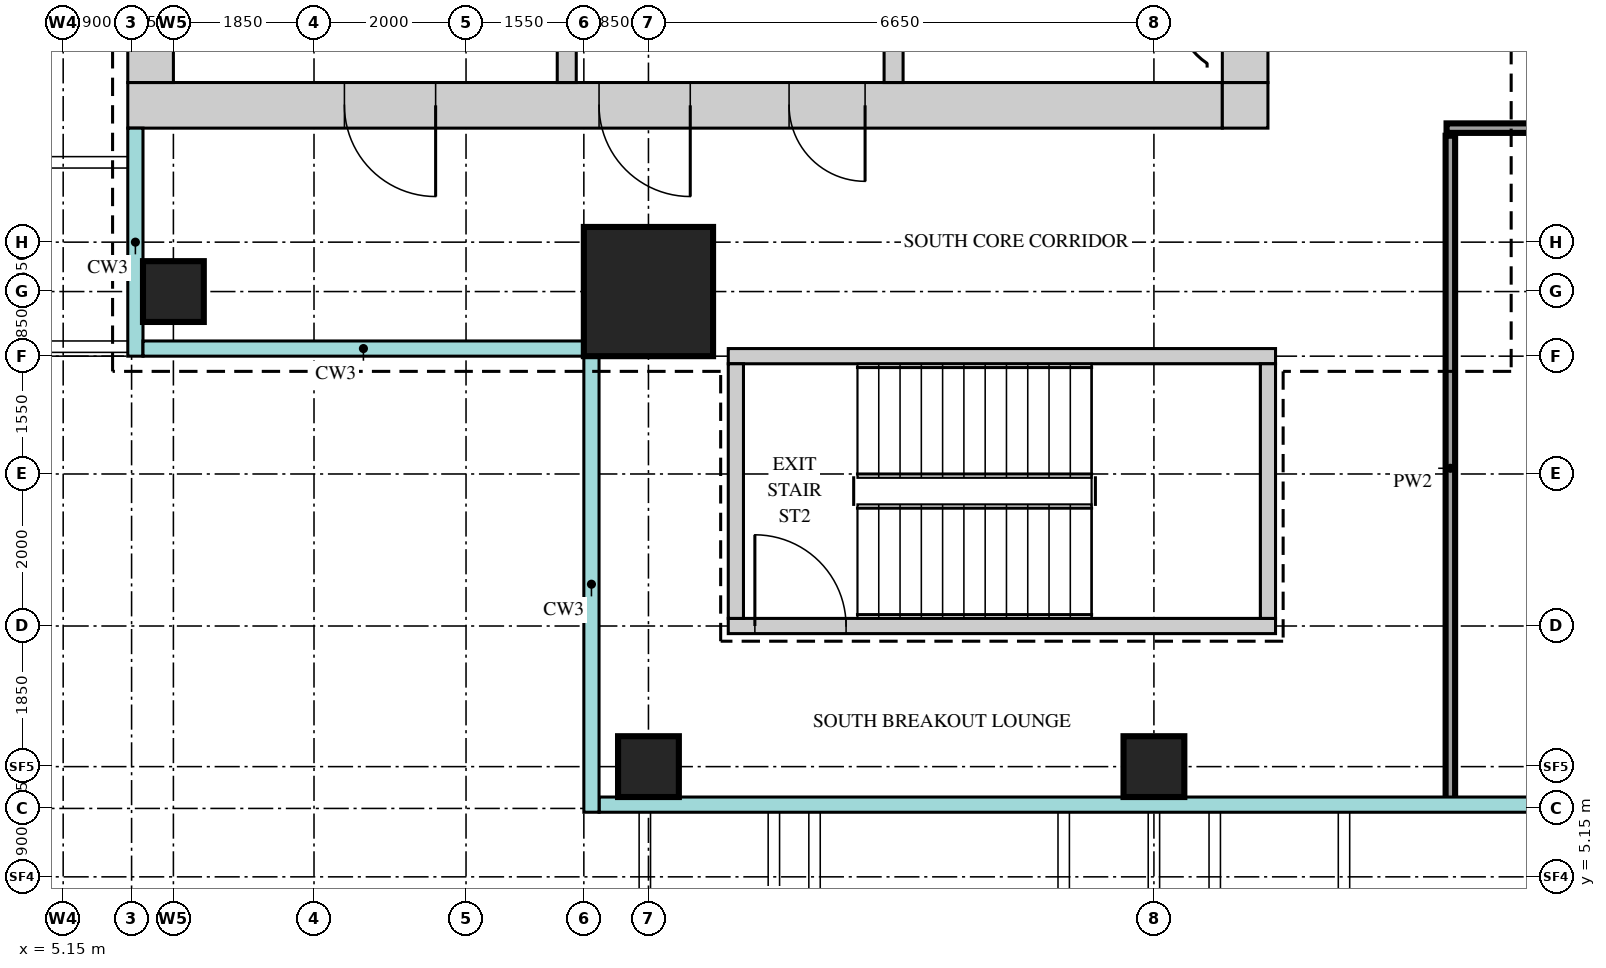
"""IFC4 building model, lengths in metres.
Left out: names, types, materials, properties, quantities, classifications, styles, units other than length and angle.
Written with IfcOpenShell. Run it as: python <this file> out.ifc"""

import sys

from ifc_helpers import new_model, si_unit, direction, frame, frame_2d, origin, origin_2d, place, context, subcontext, project, spatial, rectangle, extrude, source, transform, mapped, element, fill, save


model = new_model("IFC4")
c1 = context("Model", 3, precision=1e-05, world=origin(), true_north=direction((0.0, 1.0)))
c2 = subcontext(c1, "Body", "Model", "MODEL_VIEW")
j1 = project(units=[si_unit("LENGTHUNIT", "METRE"), si_unit("PLANEANGLEUNIT", "RADIAN")], contexts=[c1])
p1 = place(None, origin())
s1 = spatial("IfcSite", under=j1, at=p1, CompositionType="ELEMENT")
p2 = place(p1, origin())
s2 = spatial("IfcBuilding", under=s1, at=p2, CompositionType="ELEMENT")
p3 = place(p2, frame((0.0, 0.0, 306.2)))
s3 = spatial("IfcBuildingStorey", under=s2, at=p3, CompositionType="ELEMENT", Elevation=306.2)
m1 = source(origin(), c2, "Body", "SweptSolid", [
    extrude(rectangle(XDim=14.4, YDim=0.6, at=frame_2d((7.2, 0.0))), origin(), (0.0, 0.0, 1.0), 3.75),
])
p4 = place(p3, frame((6.0, 15.3, 0.0), z_axis=(0.0, 0.0, 1.0), x_axis=(1.0, 0.0, 0.0)))
e1 = element("IfcWall", 1, at=p4, inside=s3, PredefinedType="SHEAR", context=c2, shape_type="MappedRepresentation", body=[
    mapped(m1, transform((0.0, 0.0, 0.0))),
])
m2 = source(origin(), c2, "Body", "SweptSolid", [
    extrude(rectangle(XDim=1.2, YDim=2.1, at=frame_2d((0.6, 1.05))), frame((0.0, 0.31, 0.0), z_axis=(0.0, -1.0, 0.0), x_axis=(1.0, 0.0, 0.0)), (0.0, 0.0, 1.0), 0.62),
])
p5 = place(p4, frame((6.2, 0.0, 0.0)))
e2 = element("IfcOpeningElement", 2, at=p5, cuts=e1, PredefinedType="OPENING", context=c2, shape_type="MappedRepresentation", body=[
    mapped(m2, transform((0.0, 0.0, 0.0))),
])
p6 = place(p4, frame((2.85, 0.0, 0.0)))
e3 = element("IfcOpeningElement", 3, at=p6, cuts=e1, PredefinedType="OPENING", context=c2, shape_type="MappedRepresentation", body=[
    mapped(m2, transform((0.0, 0.0, 0.0))),
])
m3 = source(origin(), c2, "Body", "SweptSolid", [
    extrude(rectangle(XDim=1.0, YDim=2.1, at=frame_2d((0.5, 1.05))), frame((0.0, 0.31, 0.0), z_axis=(0.0, -1.0, 0.0), x_axis=(1.0, 0.0, 0.0)), (0.0, 0.0, 1.0), 0.62),
])
p7 = place(p4, frame((8.7, 0.0, 0.0)))
e4 = element("IfcOpeningElement", 4, at=p7, cuts=e1, PredefinedType="OPENING", context=c2, shape_type="MappedRepresentation", body=[
    mapped(m3, transform((0.0, 0.0, 0.0))),
])
m4 = source(origin(), c2, "Body", "SweptSolid", [
    extrude(rectangle(XDim=0.6, YDim=0.6, at=frame_2d((0.3, 0.0))), origin(), (0.0, 0.0, 1.0), 3.75),
])
p8 = place(p3, frame((20.4, 15.3, 0.0), z_axis=(0.0, 0.0, 1.0), x_axis=(1.0, 0.0, 0.0)))
e5 = element("IfcWall", 5, at=p8, inside=s3, PredefinedType="SHEAR", context=c2, shape_type="MappedRepresentation", body=[
    mapped(m4, transform((0.0, 0.0, 0.0))),
])
m5 = source(origin(), c2, "Body", "SweptSolid", [
    extrude(rectangle(XDim=22.8, YDim=0.6, at=frame_2d((11.4, 0.0))), origin(), (0.0, 0.0, 1.0), 3.75),
])
p9 = place(p3, frame((20.7, 15.6, 0.0), z_axis=(0.0, 0.0, 1.0), x_axis=(0.0, 1.0, 0.0)))
e6 = element("IfcWall", 6, at=p9, inside=s3, PredefinedType="SHEAR", context=c2, shape_type="MappedRepresentation", body=[
    mapped(m5, transform((0.0, 0.0, 0.0))),
])
m6 = source(origin(), c2, "Body", "SweptSolid", [
    extrude(rectangle(XDim=1.8, YDim=2.1, at=frame_2d((0.9, 1.05))), frame((0.0, 0.31, 0.0), z_axis=(0.0, -1.0, 0.0), x_axis=(1.0, 0.0, 0.0)), (0.0, 0.0, 1.0), 0.62),
])
p10 = place(p9, frame((10.9, 0.0, 0.0)))
e7 = element("IfcOpeningElement", 7, at=p10, cuts=e6, PredefinedType="OPENING", context=c2, shape_type="MappedRepresentation", body=[
    mapped(m6, transform((0.0, 0.0, 0.0))),
])
m7 = source(origin(), c2, "Body", "SweptSolid", [
    extrude(rectangle(XDim=0.9, YDim=2.1, at=frame_2d((0.45, 1.05))), frame((0.0, 0.31, 0.0), z_axis=(0.0, -1.0, 0.0), x_axis=(1.0, 0.0, 0.0)), (0.0, 0.0, 1.0), 0.62),
])
p11 = place(p9, frame((0.55, 0.0, 0.0)))
e8 = element("IfcOpeningElement", 8, at=p11, cuts=e6, PredefinedType="OPENING", context=c2, shape_type="MappedRepresentation", body=[
    mapped(m7, transform((0.0, 0.0, 0.0))),
])
p12 = place(p9, frame((3.0, 0.0, 0.0)))
e9 = element("IfcOpeningElement", 9, at=p12, cuts=e6, PredefinedType="OPENING", context=c2, shape_type="MappedRepresentation", body=[
    mapped(m7, transform((0.0, 0.0, 0.0))),
])
p13 = place(p9, frame((5.75, 0.0, 0.0)))
e10 = element("IfcOpeningElement", 10, at=p13, cuts=e6, PredefinedType="OPENING", context=c2, shape_type="MappedRepresentation", body=[
    mapped(m7, transform((0.0, 0.0, 0.0))),
])
p14 = place(p3, frame((6.3, 15.6, 0.0), z_axis=(0.0, 0.0, 1.0), x_axis=(0.0, 1.0, 0.0)))
e11 = element("IfcWall", 11, at=p14, inside=s3, PredefinedType="SHEAR", context=c2, shape_type="MappedRepresentation", body=[
    mapped(m5, transform((0.0, 0.0, 0.0))),
])
m8 = source(origin(), c2, "Body", "SweptSolid", [
    extrude(rectangle(XDim=7.2, YDim=0.2, at=frame_2d((3.6, 0.0))), origin(), (0.0, 0.0, 1.0), 3.75),
])
p15 = place(p3, frame((13.9, 12.0, 0.0), z_axis=(0.0, 0.0, 1.0), x_axis=(1.0, 0.0, 0.0)))
e12 = element("IfcWall", 12, at=p15, inside=s3, PredefinedType="SHEAR", context=c2, shape_type="MappedRepresentation", body=[
    mapped(m8, transform((0.0, 0.0, 0.0))),
])
p16 = place(p3, frame((13.9, 8.45, 0.0), z_axis=(0.0, 0.0, 1.0), x_axis=(1.0, 0.0, 0.0)))
e13 = element("IfcWall", 13, at=p16, inside=s3, PredefinedType="SHEAR", context=c2, shape_type="MappedRepresentation", body=[
    mapped(m8, transform((0.0, 0.0, 0.0))),
])
m9 = source(origin(), c2, "Body", "SweptSolid", [
    extrude(rectangle(XDim=1.2, YDim=2.1, at=frame_2d((0.6, 1.05))), frame((0.0, 0.11, 0.0), z_axis=(0.0, -1.0, 0.0), x_axis=(1.0, 0.0, 0.0)), (0.0, 0.0, 1.0), 0.22),
])
p17 = place(p16, frame((0.35, 0.0, 0.0)))
e14 = element("IfcOpeningElement", 14, at=p17, cuts=e13, PredefinedType="OPENING", context=c2, shape_type="MappedRepresentation", body=[
    mapped(m9, transform((0.0, 0.0, 0.0))),
])
m10 = source(origin(), c2, "Body", "SweptSolid", [
    extrude(rectangle(XDim=3.35, YDim=0.2, at=frame_2d((1.675, 0.0))), origin(), (0.0, 0.0, 1.0), 3.75),
])
for number, where, z_axis, x_axis in (
    (15, (21.0, 8.55, 0.0), (0.0, 0.0, 1.0), (0.0, 1.0, 0.0)),
    (16, (14.0, 8.55, 0.0), (0.0, 0.0, 1.0), (0.0, 1.0, 0.0)),
):
    element("IfcWall", number, at=place(p3, frame(where, z_axis=z_axis, x_axis=x_axis)), inside=s3, PredefinedType="SHEAR", context=c2, shape_type="MappedRepresentation", body=[
        mapped(m10, transform((0.0, 0.0, 0.0))),
    ])
m11 = source(origin(), c2, "Body", "SweptSolid", [
    extrude(rectangle(XDim=3.6, YDim=0.25, at=frame_2d((1.8, 0.0))), origin(), (0.0, 0.0, 1.0), 3.75),
])
for number, where, z_axis, x_axis in (
    (17, (16.075, 15.6, 0.0), (0.0, 0.0, 1.0), (0.0, 1.0, 0.0)),
    (18, (11.775, 15.6, 0.0), (0.0, 0.0, 1.0), (0.0, 1.0, 0.0)),
):
    element("IfcWall", number, at=place(p3, frame(where, z_axis=z_axis, x_axis=x_axis)), inside=s3, PredefinedType="STANDARD", context=c2, shape_type="MappedRepresentation", body=[
        mapped(m11, transform((0.0, 0.0, 0.0))),
    ])
m12 = source(origin(), c2, "Body", "SweptSolid", [
    extrude(rectangle(XDim=1.7, YDim=1.7, at=origin_2d()), origin(), (0.0, 0.0, 1.0), 3.75),
])
p18 = place(p3, frame((12.85, 12.85, 0.0), z_axis=(0.0, 0.0, 1.0), x_axis=(1.0, 0.0, 0.0)))
e19 = element("IfcColumn", 19, at=p18, inside=s3, PredefinedType="COLUMN", context=c2, shape_type="MappedRepresentation", body=[
    mapped(m12, transform((0.0, 0.0, 0.0))),
])
m13 = source(origin(), c2, "Body", "SweptSolid", [
    extrude(rectangle(XDim=0.8, YDim=0.8, at=origin_2d()), origin(), (0.0, 0.0, 1.0), 3.75),
])
for number, where, z_axis, x_axis in (
    (20, (12.85, 6.6, 0.0), (0.0, 0.0, 1.0), (1.0, 0.0, 0.0)),
    (21, (19.5, 6.6, 0.0), (0.0, 0.0, 1.0), (1.0, 0.0, 0.0)),
    (22, (6.6, 12.85, 0.0), (0.0, 0.0, 1.0), (1.0, 0.0, 0.0)),
):
    element("IfcColumn", number, at=place(p3, frame(where, z_axis=z_axis, x_axis=x_axis)), inside=s3, PredefinedType="COLUMN", context=c2, shape_type="MappedRepresentation", body=[
        mapped(m13, transform((0.0, 0.0, 0.0))),
    ])
m14 = source(origin(), c2, "Body", "SweptSolid", [
    extrude(rectangle(XDim=8.75, YDim=0.125, at=frame_2d((4.375, 0.0))), origin(), (0.0, 0.0, 1.0), 3.8),
])
p19 = place(p3, frame((23.4, 6.15, 0.0), z_axis=(0.0, 0.0, 1.0), x_axis=(0.0, 1.0, 0.0)))
e23 = element("IfcWall", 23, at=p19, inside=s3, PredefinedType="PARTITIONING", context=c2, shape_type="MappedRepresentation", body=[
    mapped(m14, transform((0.0, 0.0, 0.0))),
])
m15 = source(origin(), c2, "Body", "SweptSolid", [
    extrude(rectangle(XDim=19.1, YDim=0.125, at=frame_2d((9.55, 0.0))), origin(), (0.0, 0.0, 1.0), 3.8),
])
p20 = place(p3, frame((23.35, 15.0, 0.0), z_axis=(0.0, 0.0, 1.0), x_axis=(1.0, 0.0, 0.0)))
e24 = element("IfcWall", 24, at=p20, inside=s3, PredefinedType="PARTITIONING", context=c2, shape_type="MappedRepresentation", body=[
    mapped(m15, transform((0.0, 0.0, 0.0))),
])
m16 = source(origin(), c2, "Body", "SweptSolid", [
    extrude(rectangle(XDim=1.2, YDim=2.1, at=frame_2d((0.6, 1.05))), frame((0.0, 0.073, 0.0), z_axis=(0.0, -1.0, 0.0), x_axis=(1.0, 0.0, 0.0)), (0.0, 0.0, 1.0), 0.145),
])
p21 = place(p20, frame((7.75, 0.0, 0.0)))
e25 = element("IfcOpeningElement", 25, at=p21, cuts=e24, PredefinedType="OPENING", context=c2, shape_type="MappedRepresentation", body=[
    mapped(m16, transform((0.0, 0.0, 0.0))),
])
m17 = source(origin(), c2, "Body", "SweptSolid", [
    extrude(rectangle(XDim=1.2, YDim=2.1, at=frame_2d((0.6, 1.05))), frame((0.0, 0.25, 0.0), z_axis=(0.0, -1.0, 0.0), x_axis=(1.0, 0.0, 0.0)), (0.0, 0.0, 1.0), 0.5),
])
p22 = place(p5, origin())
e26 = element("IfcDoor", 26, at=p22, inside=s3, OperationType="SINGLE_SWING_RIGHT", PredefinedType="DOOR", context=c2, shape_type="MappedRepresentation", body=[
    mapped(m17, transform((0.0, 0.0, 0.0))),
])
fill(e2, e26)
p23 = place(p6, origin())
e27 = element("IfcDoor", 27, at=p23, inside=s3, OperationType="SINGLE_SWING_RIGHT", PredefinedType="DOOR", context=c2, shape_type="MappedRepresentation", body=[
    mapped(m17, transform((0.0, 0.0, 0.0))),
])
fill(e3, e27)
m18 = source(origin(), c2, "Body", "SweptSolid", [
    extrude(rectangle(XDim=1.0, YDim=2.1, at=frame_2d((0.5, 1.05))), frame((0.0, 0.25, 0.0), z_axis=(0.0, -1.0, 0.0), x_axis=(1.0, 0.0, 0.0)), (0.0, 0.0, 1.0), 0.5),
])
p24 = place(p7, origin())
e28 = element("IfcDoor", 28, at=p24, inside=s3, OperationType="SINGLE_SWING_RIGHT", PredefinedType="DOOR", context=c2, shape_type="MappedRepresentation", body=[
    mapped(m18, transform((0.0, 0.0, 0.0))),
])
fill(e4, e28)
m19 = source(origin(), c2, "Body", "SweptSolid", [
    extrude(rectangle(XDim=1.2, YDim=2.1, at=frame_2d((0.6, 1.05))), frame((0.0, 0.025, 0.0), z_axis=(0.0, -1.0, 0.0), x_axis=(1.0, 0.0, 0.0)), (0.0, 0.0, 1.0), 0.05),
])
p25 = place(p17, origin())
e29 = element("IfcDoor", 29, at=p25, inside=s3, OperationType="SINGLE_SWING_RIGHT", PredefinedType="DOOR", context=c2, shape_type="MappedRepresentation", body=[
    mapped(m19, transform((0.0, 0.0, 0.0))),
])
fill(e14, e29)
save(model, sys.argv[1])
